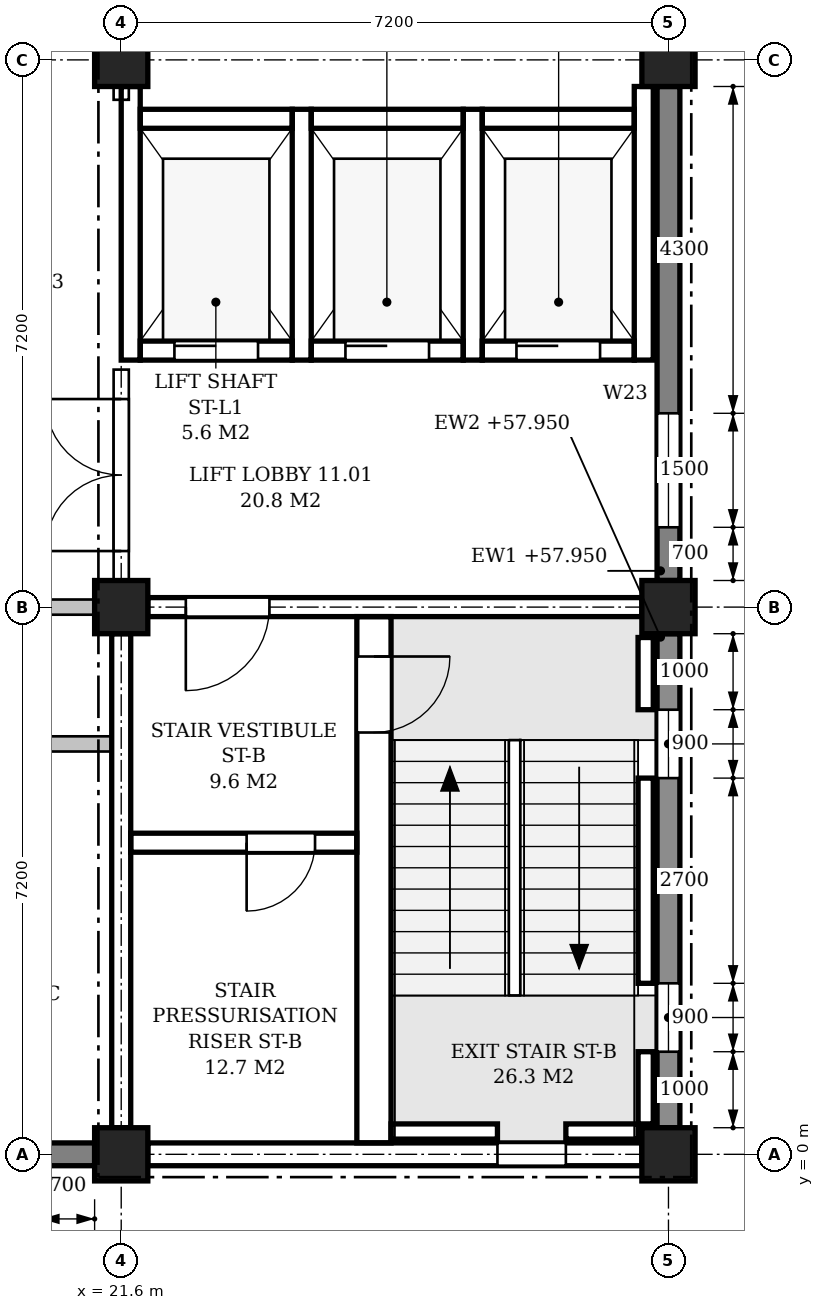
"""IFC4 building model, lengths in metres.
Left out: names, types, materials, properties, quantities, classifications, styles, units other than length and angle.
Written with IfcOpenShell. Run it as: python <this file> out.ifc"""

import sys

from ifc_helpers import new_model, si_unit, direction, frame, frame_2d, origin, origin_2d, place, context, subcontext, project, spatial, polyline, rectangle, outline, extrude, element, fill, save


model = new_model("IFC4")
c1 = context("Model", 3, precision=1e-05, world=origin(), true_north=direction((0.0, 1.0)))
c2 = subcontext(c1, "Body", "Model", "MODEL_VIEW")
j1 = project(units=[si_unit("LENGTHUNIT", "METRE"), si_unit("PLANEANGLEUNIT", "RADIAN")], contexts=[c1])
p1 = place(None, origin())
s1 = spatial("IfcSite", under=j1, at=p1, CompositionType="ELEMENT")
p2 = place(p1, origin())
s2 = spatial("IfcBuilding", under=s1, at=p2, CompositionType="ELEMENT")
p3 = place(p2, frame((0.0, 0.0, 54.3)))
s3 = spatial("IfcBuildingStorey", under=s2, at=p3, CompositionType="ELEMENT", Elevation=54.3)
for number, where, z_axis, x_axis in (
    (1, (21.6, 0.0, 0.0), (0.0, 0.0, 1.0), (1.0, 0.0, 0.0)),
    (2, (21.6, 7.2, 0.0), (0.0, 0.0, 1.0), (1.0, 0.0, 0.0)),
    (3, (21.6, 14.4, 0.0), (0.0, 0.0, 1.0), (1.0, 0.0, 0.0)),
    (4, (28.8, 0.0, 0.0), (0.0, 0.0, 1.0), (1.0, 0.0, 0.0)),
    (5, (28.8, 7.2, 0.0), (0.0, 0.0, 1.0), (1.0, 0.0, 0.0)),
    (6, (28.8, 14.4, 0.0), (0.0, 0.0, 1.0), (1.0, 0.0, 0.0)),
):
    element("IfcColumn", number, at=place(p3, frame(where, z_axis=z_axis, x_axis=x_axis)), inside=s3, PredefinedType="COLUMN", context=c2, shape_type="SweptSolid", body=[
        extrude(rectangle(XDim=0.7, YDim=0.7, at=origin_2d()), origin(), (0.0, 0.0, 1.0), 4.5),
    ])
p4 = place(p3, frame((14.75, 0.0, 0.0), z_axis=(0.0, 0.0, 1.0), x_axis=(1.0, 0.0, 0.0)))
e7 = element("IfcWall", 7, at=p4, inside=s3, PredefinedType="STANDARD", context=c2, shape_type="SweptSolid", body=[
    extrude(rectangle(XDim=6.5, YDim=0.3, at=frame_2d((3.25, 0.0))), origin(), (0.0, 0.0, 1.0), 3.65),
])
p5 = place(p4, frame((0.7, 0.0, 0.9)))
e8 = element("IfcOpeningElement", 8, at=p5, cuts=e7, PredefinedType="OPENING", context=c2, shape_type="SweptSolid", body=[
    extrude(outline(polyline([(0.0, 0.0), (1.5, 0.0), (1.5, 1.95), (0.75, 2.7), (0.0, 1.95), (0.0, 0.0)])), frame((0.0, 0.16, 0.0), z_axis=(0.0, -1.0, 0.0), x_axis=(1.0, 0.0, 0.0)), (0.0, 0.0, 1.0), 0.32),
])
p6 = place(p4, frame((4.3, 0.0, 0.9)))
e9 = element("IfcOpeningElement", 9, at=p6, cuts=e7, PredefinedType="OPENING", context=c2, shape_type="SweptSolid", body=[
    extrude(outline(polyline([(0.0, 0.0), (1.5, 0.0), (1.5, 1.95), (0.75, 2.7), (0.0, 1.95), (0.0, 0.0)])), frame((0.0, 0.16, 0.0), z_axis=(0.0, -1.0, 0.0), x_axis=(1.0, 0.0, 0.0)), (0.0, 0.0, 1.0), 0.32),
])
p7 = place(p3, frame((21.95, 0.0, 0.0), z_axis=(0.0, 0.0, 1.0), x_axis=(1.0, 0.0, 0.0)))
e10 = element("IfcWall", 10, at=p7, inside=s3, PredefinedType="STANDARD", context=c2, shape_type="SweptSolid", body=[
    extrude(rectangle(XDim=6.5, YDim=0.3, at=frame_2d((3.25, 0.0))), origin(), (0.0, 0.0, 1.0), 3.65),
])
p8 = place(p7, frame((4.6, 0.0, 0.9)))
e11 = element("IfcOpeningElement", 11, at=p8, cuts=e10, PredefinedType="OPENING", context=c2, shape_type="SweptSolid", body=[
    extrude(outline(polyline([(0.0, 0.0), (0.9, 0.0), (0.9, 2.25), (0.45, 2.7), (0.0, 2.25), (0.0, 0.0)])), frame((0.0, 0.16, 0.0), z_axis=(0.0, -1.0, 0.0), x_axis=(1.0, 0.0, 0.0)), (0.0, 0.0, 1.0), 0.32),
])
p9 = place(p3, frame((28.8, 0.35, 0.0), z_axis=(0.0, 0.0, 1.0), x_axis=(0.0, 1.0, 0.0)))
e12 = element("IfcWall", 12, at=p9, inside=s3, PredefinedType="STANDARD", context=c2, shape_type="SweptSolid", body=[
    extrude(rectangle(XDim=6.5, YDim=0.3, at=frame_2d((3.25, 0.0))), origin(), (0.0, 0.0, 1.0), 3.65),
])
p10 = place(p9, frame((1.0, 0.0, 0.9)))
e13 = element("IfcOpeningElement", 13, at=p10, cuts=e12, PredefinedType="OPENING", context=c2, shape_type="SweptSolid", body=[
    extrude(outline(polyline([(0.0, 0.0), (0.9, 0.0), (0.9, 2.25), (0.45, 2.7), (0.0, 2.25), (0.0, 0.0)])), frame((0.0, 0.16, 0.0), z_axis=(0.0, -1.0, 0.0), x_axis=(1.0, 0.0, 0.0)), (0.0, 0.0, 1.0), 0.32),
])
p11 = place(p9, frame((4.6, 0.0, 0.9)))
e14 = element("IfcOpeningElement", 14, at=p11, cuts=e12, PredefinedType="OPENING", context=c2, shape_type="SweptSolid", body=[
    extrude(outline(polyline([(0.0, 0.0), (0.9, 0.0), (0.9, 2.25), (0.45, 2.7), (0.0, 2.25), (0.0, 0.0)])), frame((0.0, 0.16, 0.0), z_axis=(0.0, -1.0, 0.0), x_axis=(1.0, 0.0, 0.0)), (0.0, 0.0, 1.0), 0.32),
])
p12 = place(p3, frame((28.8, 7.55, 0.0), z_axis=(0.0, 0.0, 1.0), x_axis=(0.0, 1.0, 0.0)))
e15 = element("IfcWall", 15, at=p12, inside=s3, PredefinedType="STANDARD", context=c2, shape_type="SweptSolid", body=[
    extrude(rectangle(XDim=6.5, YDim=0.3, at=frame_2d((3.25, 0.0))), origin(), (0.0, 0.0, 1.0), 3.65),
])
p13 = place(p12, frame((0.7, 0.0, 0.9)))
e16 = element("IfcOpeningElement", 16, at=p13, cuts=e15, PredefinedType="OPENING", context=c2, shape_type="SweptSolid", body=[
    extrude(outline(polyline([(0.0, 0.0), (1.5, 0.0), (1.5, 1.95), (0.75, 2.7), (0.0, 1.95), (0.0, 0.0)])), frame((0.0, 0.16, 0.0), z_axis=(0.0, -1.0, 0.0), x_axis=(1.0, 0.0, 0.0)), (0.0, 0.0, 1.0), 0.32),
])
p14 = place(p3, frame((21.95, 7.2, 0.0), z_axis=(0.0, 0.0, 1.0), x_axis=(1.0, 0.0, 0.0)))
e17 = element("IfcWall", 17, at=p14, inside=s3, PredefinedType="SHEAR", context=c2, shape_type="SweptSolid", body=[
    extrude(rectangle(XDim=6.5, YDim=0.25, at=frame_2d((3.25, 0.0))), origin(), (0.0, 0.0, 1.0), 3.55),
])
p15 = place(p14, frame((0.5, 0.0, 0.0)))
e18 = element("IfcOpeningElement", 18, at=p15, cuts=e17, PredefinedType="OPENING", context=c2, shape_type="SweptSolid", body=[
    extrude(rectangle(XDim=1.1, YDim=2.1, at=frame_2d((0.55, 1.05))), frame((0.0, 0.135, 0.0), z_axis=(0.0, -1.0, 0.0), x_axis=(1.0, 0.0, 0.0)), (0.0, 0.0, 1.0), 0.27),
])
p16 = place(p3, frame((21.6, 0.35, 0.0), z_axis=(0.0, 0.0, 1.0), x_axis=(0.0, 1.0, 0.0)))
e19 = element("IfcWall", 19, at=p16, inside=s3, PredefinedType="SHEAR", context=c2, shape_type="SweptSolid", body=[
    extrude(rectangle(XDim=6.5, YDim=0.25, at=frame_2d((3.25, 0.0))), origin(), (0.0, 0.0, 1.0), 3.55),
])
p17 = place(p3, frame((28.5, 0.4, -0.25), z_axis=(0.0, 0.0, 1.0), x_axis=(0.0, 1.0, 0.0)))
e20 = element("IfcWall", 20, at=p17, inside=s3, PredefinedType="SHEAR", context=c2, shape_type="SweptSolid", body=[
    extrude(rectangle(XDim=0.95, YDim=0.2, at=frame_2d((0.475, 0.0))), origin(), (0.0, 0.0, 1.0), 4.5),
])
p18 = place(p3, frame((28.5, 2.25, -0.25), z_axis=(0.0, 0.0, 1.0), x_axis=(0.0, 1.0, 0.0)))
e21 = element("IfcWall", 21, at=p18, inside=s3, PredefinedType="SHEAR", context=c2, shape_type="SweptSolid", body=[
    extrude(rectangle(XDim=2.7, YDim=0.2, at=frame_2d((1.35, 0.0))), origin(), (0.0, 0.0, 1.0), 4.5),
])
p19 = place(p3, frame((28.5, 5.85, -0.25), z_axis=(0.0, 0.0, 1.0), x_axis=(0.0, 1.0, 0.0)))
e22 = element("IfcWall", 22, at=p19, inside=s3, PredefinedType="SHEAR", context=c2, shape_type="SweptSolid", body=[
    extrude(rectangle(XDim=0.95, YDim=0.2, at=frame_2d((0.475, 0.0))), origin(), (0.0, 0.0, 1.0), 4.5),
])
p20 = place(p3, frame((25.15, 0.3, -0.25), z_axis=(0.0, 0.0, 1.0), x_axis=(1.0, 0.0, 0.0)))
e23 = element("IfcWall", 23, at=p20, inside=s3, PredefinedType="SHEAR", context=c2, shape_type="SweptSolid", body=[
    extrude(rectangle(XDim=1.4, YDim=0.2, at=frame_2d((0.7, 0.0))), origin(), (0.0, 0.0, 1.0), 4.5),
])
p21 = place(p3, frame((27.45, 0.3, -0.25), z_axis=(0.0, 0.0, 1.0), x_axis=(1.0, 0.0, 0.0)))
e24 = element("IfcWall", 24, at=p21, inside=s3, PredefinedType="SHEAR", context=c2, shape_type="SweptSolid", body=[
    extrude(rectangle(XDim=0.95, YDim=0.2, at=frame_2d((0.475, 0.0))), origin(), (0.0, 0.0, 1.0), 4.5),
])
p22 = place(p3, frame((24.925, 0.15, 0.0), z_axis=(0.0, 0.0, 1.0), x_axis=(0.0, 1.0, 0.0)))
e25 = element("IfcWall", 25, at=p22, inside=s3, PredefinedType="SHEAR", context=c2, shape_type="SweptSolid", body=[
    extrude(rectangle(XDim=6.925, YDim=0.45, at=frame_2d((3.462, 0.0))), origin(), (0.0, 0.0, 1.0), 4.25),
])
p23 = place(p22, frame((5.4, 0.0, 0.0)))
e26 = element("IfcOpeningElement", 26, at=p23, cuts=e25, PredefinedType="OPENING", context=c2, shape_type="SweptSolid", body=[
    extrude(rectangle(XDim=1.0, YDim=2.1, at=frame_2d((0.5, 1.05))), frame((0.0, 0.235, 0.0), z_axis=(0.0, -1.0, 0.0), x_axis=(1.0, 0.0, 0.0)), (0.0, 0.0, 1.0), 0.47),
])
p24 = place(p3, frame((21.725, 4.1, 0.0), z_axis=(0.0, 0.0, 1.0), x_axis=(1.0, 0.0, 0.0)))
e27 = element("IfcWall", 27, at=p24, inside=s3, PredefinedType="SHEAR", context=c2, shape_type="SweptSolid", body=[
    extrude(rectangle(XDim=2.975, YDim=0.25, at=frame_2d((1.487, 0.0))), origin(), (0.0, 0.0, 1.0), 4.25),
])
p25 = place(p24, frame((1.525, 0.0, 0.0)))
e28 = element("IfcOpeningElement", 28, at=p25, cuts=e27, PredefinedType="OPENING", context=c2, shape_type="SweptSolid", body=[
    extrude(rectangle(XDim=0.9, YDim=2.1, at=frame_2d((0.45, 1.05))), frame((0.0, 0.135, 0.0), z_axis=(0.0, -1.0, 0.0), x_axis=(1.0, 0.0, 0.0)), (0.0, 0.0, 1.0), 0.27),
])
p26 = place(p3, frame((21.725, 10.45, -0.25), z_axis=(0.0, 0.0, 1.0), x_axis=(0.0, 1.0, 0.0)))
e29 = element("IfcWall", 29, at=p26, inside=s3, PredefinedType="SHEAR", context=c2, shape_type="SweptSolid", body=[
    extrude(rectangle(XDim=3.6, YDim=0.25, at=frame_2d((1.8, 0.0))), origin(), (0.0, 0.0, 1.0), 3.8),
])
for number, where, z_axis, x_axis in (
    (30, (23.975, 10.45, -0.25), (0.0, 0.0, 1.0), (0.0, 1.0, 0.0)),
    (31, (26.225, 10.45, -0.25), (0.0, 0.0, 1.0), (0.0, 1.0, 0.0)),
):
    element("IfcWall", number, at=place(p3, frame(where, z_axis=z_axis, x_axis=x_axis)), inside=s3, PredefinedType="SHEAR", context=c2, shape_type="SweptSolid", body=[
        extrude(rectangle(XDim=3.3, YDim=0.25, at=frame_2d((1.65, 0.0))), origin(), (0.0, 0.0, 1.0), 4.5),
    ])
p27 = place(p3, frame((28.475, 10.45, -0.25), z_axis=(0.0, 0.0, 1.0), x_axis=(0.0, 1.0, 0.0)))
e32 = element("IfcWall", 32, at=p27, inside=s3, PredefinedType="SHEAR", context=c2, shape_type="SweptSolid", body=[
    extrude(rectangle(XDim=3.6, YDim=0.25, at=frame_2d((1.8, 0.0))), origin(), (0.0, 0.0, 1.0), 4.5),
])
p28 = place(p3, frame((21.85, 10.575, -0.25), z_axis=(0.0, 0.0, 1.0), x_axis=(1.0, 0.0, 0.0)))
e33 = element("IfcWall", 33, at=p28, inside=s3, PredefinedType="SHEAR", context=c2, shape_type="SweptSolid", body=[
    extrude(rectangle(XDim=2.0, YDim=0.25, at=frame_2d((1.0, 0.0))), origin(), (0.0, 0.0, 1.0), 4.5),
])
p29 = place(p28, frame((0.45, 0.0, 0.25)))
e34 = element("IfcOpeningElement", 34, at=p29, cuts=e33, PredefinedType="OPENING", context=c2, shape_type="SweptSolid", body=[
    extrude(rectangle(XDim=1.1, YDim=2.1, at=frame_2d((0.55, 1.05))), frame((0.0, 0.135, 0.0), z_axis=(0.0, -1.0, 0.0), x_axis=(1.0, 0.0, 0.0)), (0.0, 0.0, 1.0), 0.27),
])
p30 = place(p3, frame((21.85, 13.625, -0.25), z_axis=(0.0, 0.0, 1.0), x_axis=(1.0, 0.0, 0.0)))
e35 = element("IfcWall", 35, at=p30, inside=s3, PredefinedType="SHEAR", context=c2, shape_type="SweptSolid", body=[
    extrude(rectangle(XDim=2.0, YDim=0.25, at=frame_2d((1.0, 0.0))), origin(), (0.0, 0.0, 1.0), 4.5),
])
p31 = place(p3, frame((24.1, 10.575, -0.25), z_axis=(0.0, 0.0, 1.0), x_axis=(1.0, 0.0, 0.0)))
e36 = element("IfcWall", 36, at=p31, inside=s3, PredefinedType="SHEAR", context=c2, shape_type="SweptSolid", body=[
    extrude(rectangle(XDim=2.0, YDim=0.25, at=frame_2d((1.0, 0.0))), origin(), (0.0, 0.0, 1.0), 4.5),
])
p32 = place(p31, frame((0.45, 0.0, 0.25)))
e37 = element("IfcOpeningElement", 37, at=p32, cuts=e36, PredefinedType="OPENING", context=c2, shape_type="SweptSolid", body=[
    extrude(rectangle(XDim=1.1, YDim=2.1, at=frame_2d((0.55, 1.05))), frame((0.0, 0.135, 0.0), z_axis=(0.0, -1.0, 0.0), x_axis=(1.0, 0.0, 0.0)), (0.0, 0.0, 1.0), 0.27),
])
p33 = place(p3, frame((24.1, 13.625, -0.25), z_axis=(0.0, 0.0, 1.0), x_axis=(1.0, 0.0, 0.0)))
e38 = element("IfcWall", 38, at=p33, inside=s3, PredefinedType="SHEAR", context=c2, shape_type="SweptSolid", body=[
    extrude(rectangle(XDim=2.0, YDim=0.25, at=frame_2d((1.0, 0.0))), origin(), (0.0, 0.0, 1.0), 4.5),
])
p34 = place(p3, frame((26.35, 10.575, -0.25), z_axis=(0.0, 0.0, 1.0), x_axis=(1.0, 0.0, 0.0)))
e39 = element("IfcWall", 39, at=p34, inside=s3, PredefinedType="SHEAR", context=c2, shape_type="SweptSolid", body=[
    extrude(rectangle(XDim=2.0, YDim=0.25, at=frame_2d((1.0, 0.0))), origin(), (0.0, 0.0, 1.0), 4.5),
])
p35 = place(p34, frame((0.45, 0.0, 0.25)))
e40 = element("IfcOpeningElement", 40, at=p35, cuts=e39, PredefinedType="OPENING", context=c2, shape_type="SweptSolid", body=[
    extrude(rectangle(XDim=1.1, YDim=2.1, at=frame_2d((0.55, 1.05))), frame((0.0, 0.135, 0.0), z_axis=(0.0, -1.0, 0.0), x_axis=(1.0, 0.0, 0.0)), (0.0, 0.0, 1.0), 0.27),
])
p36 = place(p3, frame((26.35, 13.625, -0.25), z_axis=(0.0, 0.0, 1.0), x_axis=(1.0, 0.0, 0.0)))
e41 = element("IfcWall", 41, at=p36, inside=s3, PredefinedType="SHEAR", context=c2, shape_type="SweptSolid", body=[
    extrude(rectangle(XDim=2.0, YDim=0.25, at=frame_2d((1.0, 0.0))), origin(), (0.0, 0.0, 1.0), 4.5),
])
p37 = place(p3, frame((7.325, 5.4, 0.0), z_axis=(0.0, 0.0, 1.0), x_axis=(1.0, 0.0, 0.0)))
e42 = element("IfcWall", 42, at=p37, inside=s3, PredefinedType="PARTITIONING", context=c2, shape_type="SweptSolid", body=[
    extrude(outline(polyline([(0.0, 0.0), (14.15, 0.0), (14.15, 3.55), (14.05, 3.55), (14.05, 4.25), (7.3, 4.25), (7.3, 3.55), (6.85, 3.55), (6.85, 4.25), (0.1, 4.25), (0.1, 3.55), (0.0, 3.55), (0.0, 0.0)])), frame((0.0, 0.1, 0.0), z_axis=(0.0, -1.0, 0.0), x_axis=(1.0, 0.0, 0.0)), (0.0, 0.0, 1.0), 0.2),
])
p38 = place(p37, frame((1.238, 0.0, 0.0)))
e43 = element("IfcOpeningElement", 43, at=p38, cuts=e42, PredefinedType="OPENING", context=c2, shape_type="SweptSolid", body=[
    extrude(rectangle(XDim=1.0, YDim=2.1, at=frame_2d((0.5, 1.05))), frame((0.0, 0.11, 0.0), z_axis=(0.0, -1.0, 0.0), x_axis=(1.0, 0.0, 0.0)), (0.0, 0.0, 1.0), 0.22),
])
p39 = place(p37, frame((4.775, 0.0, 0.0)))
e44 = element("IfcOpeningElement", 44, at=p39, cuts=e42, PredefinedType="OPENING", context=c2, shape_type="SweptSolid", body=[
    extrude(rectangle(XDim=1.0, YDim=2.1, at=frame_2d((0.5, 1.05))), frame((0.0, 0.11, 0.0), z_axis=(0.0, -1.0, 0.0), x_axis=(1.0, 0.0, 0.0)), (0.0, 0.0, 1.0), 0.22),
])
p40 = place(p37, frame((8.375, 0.0, 0.0)))
e45 = element("IfcOpeningElement", 45, at=p40, cuts=e42, PredefinedType="OPENING", context=c2, shape_type="SweptSolid", body=[
    extrude(rectangle(XDim=1.0, YDim=2.1, at=frame_2d((0.5, 1.05))), frame((0.0, 0.11, 0.0), z_axis=(0.0, -1.0, 0.0), x_axis=(1.0, 0.0, 0.0)), (0.0, 0.0, 1.0), 0.22),
])
p41 = place(p37, frame((11.913, 0.0, 0.0)))
e46 = element("IfcOpeningElement", 46, at=p41, cuts=e42, PredefinedType="OPENING", context=c2, shape_type="SweptSolid", body=[
    extrude(rectangle(XDim=1.0, YDim=2.1, at=frame_2d((0.5, 1.05))), frame((0.0, 0.11, 0.0), z_axis=(0.0, -1.0, 0.0), x_axis=(1.0, 0.0, 0.0)), (0.0, 0.0, 1.0), 0.22),
])
p42 = place(p3, frame((14.75, 7.2, 0.0), z_axis=(0.0, 0.0, 1.0), x_axis=(1.0, 0.0, 0.0)))
e47 = element("IfcWall", 47, at=p42, inside=s3, PredefinedType="PARTITIONING", context=c2, shape_type="SweptSolid", body=[
    extrude(rectangle(XDim=6.5, YDim=0.2, at=frame_2d((3.25, 0.0))), origin(), (0.0, 0.0, 1.0), 3.55),
])
p43 = place(p42, frame((4.375, 0.0, 0.0)))
e48 = element("IfcOpeningElement", 48, at=p43, cuts=e47, PredefinedType="OPENING", context=c2, shape_type="SweptSolid", body=[
    extrude(rectangle(XDim=1.0, YDim=2.1, at=frame_2d((0.5, 1.05))), frame((0.0, 0.11, 0.0), z_axis=(0.0, -1.0, 0.0), x_axis=(1.0, 0.0, 0.0)), (0.0, 0.0, 1.0), 0.22),
])
p44 = place(p3, frame((21.6, 7.55, 0.0), z_axis=(0.0, 0.0, 1.0), x_axis=(0.0, 1.0, 0.0)))
e49 = element("IfcWall", 49, at=p44, inside=s3, PredefinedType="PARTITIONING", context=c2, shape_type="SweptSolid", body=[
    extrude(rectangle(XDim=2.775, YDim=0.2, at=frame_2d((1.387, 0.0))), origin(), (0.0, 0.0, 1.0), 3.55),
])
p45 = place(p44, frame((0.387, 0.0, 0.0)))
e50 = element("IfcOpeningElement", 50, at=p45, cuts=e49, PredefinedType="OPENING", context=c2, shape_type="SweptSolid", body=[
    extrude(rectangle(XDim=2.0, YDim=2.4, at=frame_2d((1.0, 1.2))), frame((0.0, 0.11, 0.0), z_axis=(0.0, -1.0, 0.0), x_axis=(1.0, 0.0, 0.0)), (0.0, 0.0, 1.0), 0.22),
])
p46 = place(p3, frame((21.6, 13.875, 0.0), z_axis=(0.0, 0.0, 1.0), x_axis=(0.0, 1.0, 0.0)))
e51 = element("IfcWall", 51, at=p46, inside=s3, PredefinedType="PARTITIONING", context=c2, shape_type="SweptSolid", body=[
    extrude(rectangle(XDim=0.175, YDim=0.2, at=frame_2d((0.087, 0.0))), origin(), (0.0, 0.0, 1.0), 3.55),
])
p47 = place(p10, origin())
e52 = element("IfcWindow", 52, at=p47, inside=s3, PartitioningType="SINGLE_PANEL", PredefinedType="WINDOW", context=c2, shape_type="SweptSolid", body=[
    extrude(outline(polyline([(0.0, 0.0), (0.9, 0.0), (0.9, 2.25), (0.45, 2.7), (0.0, 2.25), (0.0, 0.0)])), frame((0.0, 0.03, 0.0), z_axis=(0.0, -1.0, 0.0), x_axis=(1.0, 0.0, 0.0)), (0.0, 0.0, 1.0), 0.06),
])
fill(e13, e52)
p48 = place(p11, origin())
e53 = element("IfcWindow", 53, at=p48, inside=s3, PartitioningType="SINGLE_PANEL", PredefinedType="WINDOW", context=c2, shape_type="SweptSolid", body=[
    extrude(outline(polyline([(0.0, 0.0), (0.9, 0.0), (0.9, 2.25), (0.45, 2.7), (0.0, 2.25), (0.0, 0.0)])), frame((0.0, 0.03, 0.0), z_axis=(0.0, -1.0, 0.0), x_axis=(1.0, 0.0, 0.0)), (0.0, 0.0, 1.0), 0.06),
])
fill(e14, e53)
p49 = place(p13, origin())
e54 = element("IfcWindow", 54, at=p49, inside=s3, PartitioningType="SINGLE_PANEL", PredefinedType="WINDOW", context=c2, shape_type="SweptSolid", body=[
    extrude(outline(polyline([(0.0, 0.0), (1.5, 0.0), (1.5, 1.95), (0.75, 2.7), (0.0, 1.95), (0.0, 0.0)])), frame((0.0, 0.03, 0.0), z_axis=(0.0, -1.0, 0.0), x_axis=(1.0, 0.0, 0.0)), (0.0, 0.0, 1.0), 0.06),
])
fill(e16, e54)
p50 = place(p8, origin())
e55 = element("IfcWindow", 55, at=p50, inside=s3, PartitioningType="SINGLE_PANEL", PredefinedType="WINDOW", context=c2, shape_type="SweptSolid", body=[
    extrude(outline(polyline([(0.0, 0.0), (0.9, 0.0), (0.9, 2.25), (0.45, 2.7), (0.0, 2.25), (0.0, 0.0)])), frame((0.0, 0.03, 0.0), z_axis=(0.0, -1.0, 0.0), x_axis=(1.0, 0.0, 0.0)), (0.0, 0.0, 1.0), 0.06),
])
fill(e11, e55)
p51 = place(p23, frame((1.0, 0.0, 0.0), z_axis=(0.0, 0.0, 1.0), x_axis=(-1.0, 0.0, 0.0)))
e56 = element("IfcDoor", 56, at=p51, inside=s3, OperationType="SINGLE_SWING_LEFT", PredefinedType="DOOR", context=c2, shape_type="SweptSolid", body=[
    extrude(rectangle(XDim=1.0, YDim=2.1, at=frame_2d((0.5, 1.05))), frame((0.0, 0.025, 0.0), z_axis=(0.0, -1.0, 0.0), x_axis=(1.0, 0.0, 0.0)), (0.0, 0.0, 1.0), 0.05),
])
fill(e26, e56)
p52 = place(p15, frame((1.1, 0.0, 0.0), z_axis=(0.0, 0.0, 1.0), x_axis=(-1.0, 0.0, 0.0)))
e57 = element("IfcDoor", 57, at=p52, inside=s3, OperationType="SINGLE_SWING_RIGHT", PredefinedType="DOOR", context=c2, shape_type="SweptSolid", body=[
    extrude(rectangle(XDim=1.1, YDim=2.1, at=frame_2d((0.55, 1.05))), frame((0.0, 0.025, 0.0), z_axis=(0.0, -1.0, 0.0), x_axis=(1.0, 0.0, 0.0)), (0.0, 0.0, 1.0), 0.05),
])
fill(e18, e57)
p53 = place(p25, frame((0.9, 0.0, 0.0), z_axis=(0.0, 0.0, 1.0), x_axis=(-1.0, 0.0, 0.0)))
e58 = element("IfcDoor", 58, at=p53, inside=s3, OperationType="SINGLE_SWING_RIGHT", PredefinedType="DOOR", context=c2, shape_type="SweptSolid", body=[
    extrude(rectangle(XDim=0.9, YDim=2.1, at=frame_2d((0.45, 1.05))), frame((0.0, 0.025, 0.0), z_axis=(0.0, -1.0, 0.0), x_axis=(1.0, 0.0, 0.0)), (0.0, 0.0, 1.0), 0.05),
])
fill(e28, e58)
p54 = place(p29, origin())
e59 = element("IfcDoor", 59, at=p54, inside=s3, OperationType="SLIDING_TO_LEFT", PredefinedType="DOOR", context=c2, shape_type="SweptSolid", body=[
    extrude(rectangle(XDim=1.1, YDim=2.1, at=frame_2d((0.55, 1.05))), frame((0.0, 0.025, 0.0), z_axis=(0.0, -1.0, 0.0), x_axis=(1.0, 0.0, 0.0)), (0.0, 0.0, 1.0), 0.05),
])
fill(e34, e59)
p55 = place(p32, origin())
e60 = element("IfcDoor", 60, at=p55, inside=s3, OperationType="SLIDING_TO_LEFT", PredefinedType="DOOR", context=c2, shape_type="SweptSolid", body=[
    extrude(rectangle(XDim=1.1, YDim=2.1, at=frame_2d((0.55, 1.05))), frame((0.0, 0.025, 0.0), z_axis=(0.0, -1.0, 0.0), x_axis=(1.0, 0.0, 0.0)), (0.0, 0.0, 1.0), 0.05),
])
fill(e37, e60)
p56 = place(p35, origin())
e61 = element("IfcDoor", 61, at=p56, inside=s3, OperationType="SLIDING_TO_LEFT", PredefinedType="DOOR", context=c2, shape_type="SweptSolid", body=[
    extrude(rectangle(XDim=1.1, YDim=2.1, at=frame_2d((0.55, 1.05))), frame((0.0, 0.025, 0.0), z_axis=(0.0, -1.0, 0.0), x_axis=(1.0, 0.0, 0.0)), (0.0, 0.0, 1.0), 0.05),
])
fill(e40, e61)
p57 = place(p45, origin())
e62 = element("IfcDoor", 62, at=p57, inside=s3, OperationType="DOUBLE_DOOR_SINGLE_SWING", PredefinedType="DOOR", context=c2, shape_type="SweptSolid", body=[
    extrude(rectangle(XDim=2.0, YDim=2.4, at=frame_2d((1.0, 1.2))), frame((0.0, 0.025, 0.0), z_axis=(0.0, -1.0, 0.0), x_axis=(1.0, 0.0, 0.0)), (0.0, 0.0, 1.0), 0.05),
])
fill(e50, e62)
save(model, sys.argv[1])
